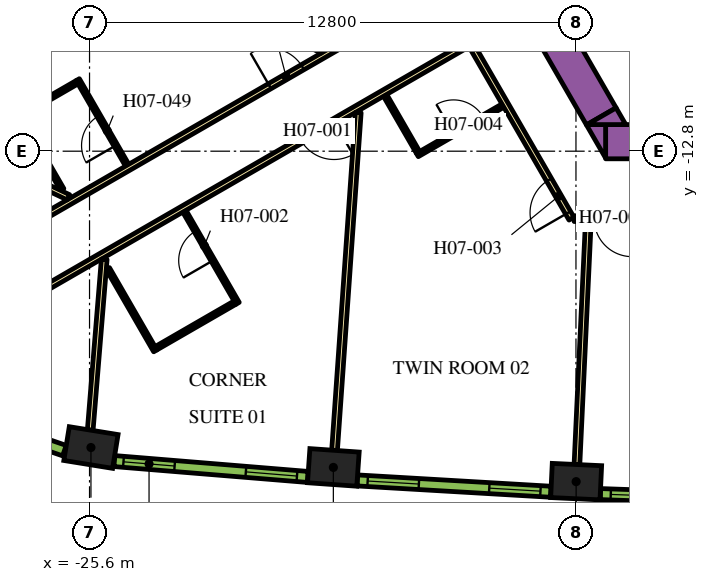
"""IFC4 building model, lengths in metres.
Left out: names, types, materials, properties, quantities, classifications, styles, units other than length and angle.
Written with IfcOpenShell. Run it as: python <this file> out.ifc"""

import sys

from ifc_helpers import new_model, si_unit, direction, frame, frame_2d, origin, origin_2d, place, context, subcontext, project, spatial, polyline, rectangle, outline, extrude, element, fill, save


model = new_model("IFC4")
c1 = context("Model", 3, precision=1e-05, world=origin(), true_north=direction((0.0, 1.0)))
c2 = subcontext(c1, "Body", "Model", "MODEL_VIEW")
j1 = project(units=[si_unit("LENGTHUNIT", "METRE"), si_unit("PLANEANGLEUNIT", "RADIAN")], contexts=[c1])
p1 = place(None, origin())
s1 = spatial("IfcSite", under=j1, at=p1, CompositionType="ELEMENT")
p2 = place(p1, origin())
s2 = spatial("IfcBuilding", under=s1, at=p2, CompositionType="ELEMENT")
p3 = place(p2, frame((0.0, 0.0, 103.2)))
s3 = spatial("IfcBuildingStorey", under=s2, at=p3, CompositionType="ELEMENT", Elevation=103.2)
for number, where, z_axis, x_axis in (
    (1, (-25.563, -20.597, 0.0), (0.0, 0.0, 1.0), (0.987, -0.159, 0.0)),
    (2, (-19.184, -21.12, 0.0), (0.0, 0.0, 1.0), (0.998, -0.07, 0.0)),
    (3, (-12.795, -21.494, 0.0), (0.0, 0.0, 1.0), (0.999, -0.047, 0.0)),
):
    element("IfcColumn", number, at=place(p3, frame(where, z_axis=z_axis, x_axis=x_axis)), inside=s3, PredefinedType="COLUMN", context=c2, shape_type="SweptSolid", body=[
        extrude(rectangle(XDim=1.3, YDim=0.9, at=origin_2d()), origin(), (0.0, 0.0, 1.0), 3.9),
    ])
p4 = place(p3, frame((-12.019, -12.55, 0.0), z_axis=(0.0, 0.0, 1.0), x_axis=(1.0, 0.0, 0.0)))
e4 = element("IfcWall", 4, at=p4, inside=s3, PredefinedType="SOLIDWALL", context=c2, shape_type="SweptSolid", body=[
    extrude(rectangle(XDim=21.63, YDim=0.9, at=frame_2d((10.815, 0.0))), origin(), (0.0, 0.0, 1.0), 3.9),
])
p5 = place(p3, origin())
e5 = element("IfcWall", 5, at=p5, inside=s3, PredefinedType="SOLIDWALL", context=c2, shape_type="SweptSolid", body=[
    extrude(outline(polyline([(-12.529, -12.1), (-12.021, -12.1), (-12.021, -12.98), (-12.529, -12.1)])), origin(), (0.0, 0.0, 1.0), 3.9),
])
p6 = place(p3, frame((-12.134, -11.883, 0.0), z_axis=(0.0, 0.0, 1.0), x_axis=(-0.500005339912, 0.866022320763, 0.0)))
e6 = element("IfcWall", 6, at=p6, inside=s3, PredefinedType="SOLIDWALL", context=c2, shape_type="SweptSolid", body=[
    extrude(rectangle(XDim=9.488, YDim=0.9, at=frame_2d((4.744, 0.0))), origin(), (0.0, 0.0, 1.0), 3.9),
])
e7 = element("IfcWall", 7, at=p5, inside=s3, PredefinedType="SOLIDWALL", context=c2, shape_type="SweptSolid", body=[
    extrude(outline(polyline([(-11.489, -12.1), (-12.505, -12.1), (-11.743, -11.66), (-11.489, -12.1)])), origin(), (0.0, 0.0, 1.0), 3.9),
])
p7 = place(p3, frame((-28.211, -15.335, 0.0), z_axis=(0.0, 0.0, 1.0), x_axis=(0.866025884867, 0.49999916674, 0.0)))
e8 = element("IfcWall", 8, at=p7, inside=s3, PredefinedType="PARTITIONING", context=c2, shape_type="SweptSolid", body=[
    extrude(rectangle(XDim=13.543, YDim=0.15, at=frame_2d((6.772, 0.0))), origin(), (0.0, 0.0, 1.0), 2.75),
])
p8 = place(p7, frame((8.488, 0.0, 0.0)))
e9 = element("IfcOpeningElement", 9, at=p8, cuts=e8, PredefinedType="OPENING", context=c2, shape_type="SweptSolid", body=[
    extrude(rectangle(XDim=1.0, YDim=2.1, at=frame_2d((0.5, 1.05))), frame((0.0, 0.085, 0.0), z_axis=(0.0, -1.0, 0.0), x_axis=(1.0, 0.0, 0.0)), (0.0, 0.0, 1.0), 0.17),
])
p9 = place(p3, frame((-15.587, -9.952, 0.0), z_axis=(0.0, 0.0, 1.0), x_axis=(-0.866017869832, -0.500013048961, 0.0)))
e10 = element("IfcWall", 10, at=p9, inside=s3, PredefinedType="PARTITIONING", context=c2, shape_type="SweptSolid", body=[
    extrude(rectangle(XDim=13.624, YDim=0.15, at=frame_2d((6.812, 0.0))), origin(), (0.0, 0.0, 1.0), 2.75),
])
p10 = place(p9, frame((4.134, 0.0, 0.0)))
e11 = element("IfcOpeningElement", 11, at=p10, cuts=e10, PredefinedType="OPENING", context=c2, shape_type="SweptSolid", body=[
    extrude(rectangle(XDim=1.0, YDim=2.1, at=frame_2d((0.5, 1.05))), frame((0.0, 0.085, 0.0), z_axis=(0.0, -1.0, 0.0), x_axis=(1.0, 0.0, 0.0)), (0.0, 0.0, 1.0), 0.17),
])
p11 = place(p3, frame((-12.918, -14.575, 0.0), z_axis=(0.0, 0.0, 1.0), x_axis=(-0.500009150678, 0.866020120573, 0.0)))
e12 = element("IfcWall", 12, at=p11, inside=s3, PredefinedType="PARTITIONING", context=c2, shape_type="SweptSolid", body=[
    extrude(rectangle(XDim=5.258, YDim=0.15, at=frame_2d((2.629, 0.0))), origin(), (0.0, 0.0, 1.0), 2.75),
])
p12 = place(p11, frame((0.18, 0.0, 0.0)))
e13 = element("IfcOpeningElement", 13, at=p12, cuts=e12, PredefinedType="OPENING", context=c2, shape_type="SweptSolid", body=[
    extrude(rectangle(XDim=1.0, YDim=2.1, at=frame_2d((0.5, 1.05))), frame((0.0, 0.085, 0.0), z_axis=(0.0, -1.0, 0.0), x_axis=(1.0, 0.0, 0.0)), (0.0, 0.0, 1.0), 0.17),
])
p13 = place(p3, frame((12.918, -14.575, 0.0), z_axis=(0.0, 0.0, 1.0), x_axis=(-1.0, 0.0, 0.0)))
e14 = element("IfcWall", 14, at=p13, inside=s3, PredefinedType="PARTITIONING", context=c2, shape_type="SweptSolid", body=[
    extrude(rectangle(XDim=25.766, YDim=0.15, at=frame_2d((12.883, 0.0))), origin(), (0.0, 0.0, 1.0), 2.75),
])
p14 = place(p13, frame((24.24, 0.0, 0.0)))
e15 = element("IfcOpeningElement", 15, at=p14, cuts=e14, PredefinedType="OPENING", context=c2, shape_type="SweptSolid", body=[
    extrude(rectangle(XDim=1.0, YDim=2.1, at=frame_2d((0.5, 1.05))), frame((0.0, 0.085, 0.0), z_axis=(0.0, -1.0, 0.0), x_axis=(1.0, 0.0, 0.0)), (0.0, 0.0, 1.0), 0.17),
])
p15 = place(p13, frame((13.144, 0.0, 0.0)))
e16 = element("IfcOpeningElement", 16, at=p15, cuts=e14, PredefinedType="OPENING", context=c2, shape_type="SweptSolid", body=[
    extrude(rectangle(XDim=1.0, YDim=2.1, at=frame_2d((0.5, 1.05))), frame((0.0, 0.085, 0.0), z_axis=(0.0, -1.0, 0.0), x_axis=(1.0, 0.0, 0.0)), (0.0, 0.0, 1.0), 0.17),
])
p16 = place(p13, frame((11.693, 0.0, 0.0)))
e17 = element("IfcOpeningElement", 17, at=p16, cuts=e14, PredefinedType="OPENING", context=c2, shape_type="SweptSolid", body=[
    extrude(rectangle(XDim=1.0, YDim=2.1, at=frame_2d((0.5, 1.05))), frame((0.0, 0.085, 0.0), z_axis=(0.0, -1.0, 0.0), x_axis=(1.0, 0.0, 0.0)), (0.0, 0.0, 1.0), 0.17),
])
p17 = place(p13, frame((0.596, 0.0, 0.0)))
e18 = element("IfcOpeningElement", 18, at=p17, cuts=e14, PredefinedType="OPENING", context=c2, shape_type="SweptSolid", body=[
    extrude(rectangle(XDim=1.0, YDim=2.1, at=frame_2d((0.5, 1.05))), frame((0.0, 0.085, 0.0), z_axis=(0.0, -1.0, 0.0), x_axis=(1.0, 0.0, 0.0)), (0.0, 0.0, 1.0), 0.17),
])
p18 = place(p3, frame((-30.231, -12.085, 0.0), z_axis=(0.0, 0.0, 1.0), x_axis=(0.904001132572, -0.427530060122, 0.0)))
e19 = element("IfcWall", 19, at=p18, inside=s3, PredefinedType="PARTITIONING", context=c2, shape_type="SweptSolid", body=[
    extrude(rectangle(XDim=4.51, YDim=0.15, at=frame_2d((2.255, 0.0))), origin(), (0.0, 0.0, 1.0), 2.75),
])
p19 = place(p3, frame((-25.582, -20.138, 0.0), z_axis=(0.0, 0.0, 1.0), x_axis=(0.081746132986, 0.996653184283, 0.0)))
e20 = element("IfcWall", 20, at=p19, inside=s3, PredefinedType="PARTITIONING", context=c2, shape_type="SweptSolid", body=[
    extrude(rectangle(XDim=4.51, YDim=0.15, at=frame_2d((2.255, 0.0))), origin(), (0.0, 0.0, 1.0), 2.75),
])
p20 = place(p3, frame((-27.479, -6.251, 0.0), z_axis=(0.0, 0.0, 1.0), x_axis=(0.898945877276, -0.438059710231, 0.0)))
e21 = element("IfcWall", 21, at=p20, inside=s3, PredefinedType="PARTITIONING", context=c2, shape_type="SweptSolid", body=[
    extrude(rectangle(XDim=8.909, YDim=0.15, at=frame_2d((4.455, 0.0))), origin(), (0.0, 0.0, 1.0), 2.75),
])
p21 = place(p3, frame((-19.153, -20.671, 0.0), z_axis=(0.0, 0.0, 1.0), x_axis=(0.070070736723, 0.997542025107, 0.0)))
e22 = element("IfcWall", 22, at=p21, inside=s3, PredefinedType="PARTITIONING", context=c2, shape_type="SweptSolid", body=[
    extrude(rectangle(XDim=8.909, YDim=0.15, at=frame_2d((4.455, 0.0))), origin(), (0.0, 0.0, 1.0), 2.75),
])
p22 = place(p3, frame((-12.774, -21.045, 0.0), z_axis=(0.0, 0.0, 1.0), x_axis=(0.046750341626, 0.998906605023, 0.0)))
e23 = element("IfcWall", 23, at=p22, inside=s3, PredefinedType="PARTITIONING", context=c2, shape_type="SweptSolid", body=[
    extrude(rectangle(XDim=6.392, YDim=0.15, at=frame_2d((3.196, 0.0))), origin(), (0.0, 0.0, 1.0), 2.75),
])
p23 = place(p3, frame((-21.704, -16.803, 0.0), z_axis=(0.0, 0.0, 1.0), x_axis=(-0.500049511043, 0.865996816683, 0.0)))
e24 = element("IfcWall", 24, at=p23, inside=s3, PredefinedType="PARTITIONING", context=c2, shape_type="SweptSolid", body=[
    extrude(rectangle(XDim=2.8, YDim=0.1, at=frame_2d((1.4, 0.0))), origin(), (0.0, 0.0, 1.0), 2.75),
])
p24 = place(p23, frame((1.3, 0.0, 0.0)))
e25 = element("IfcOpeningElement", 25, at=p24, cuts=e24, PredefinedType="OPENING", context=c2, shape_type="SweptSolid", body=[
    extrude(rectangle(XDim=0.9, YDim=2.1, at=frame_2d((0.45, 1.05))), frame((0.0, 0.06, 0.0), z_axis=(0.0, -1.0, 0.0), x_axis=(1.0, 0.0, 0.0)), (0.0, 0.0, 1.0), 0.12),
])
p25 = place(p3, frame((-21.772, -16.785, 0.0), z_axis=(0.0, 0.0, 1.0), x_axis=(-0.866024647952, -0.500001309137, 0.0)))
e26 = element("IfcWall", 26, at=p25, inside=s3, PredefinedType="PARTITIONING", context=c2, shape_type="SweptSolid", body=[
    extrude(rectangle(XDim=2.4, YDim=0.1, at=frame_2d((1.2, 0.0))), origin(), (0.0, 0.0, 1.0), 2.75),
])
p26 = place(p3, frame((-25.119, -15.888, 0.0), z_axis=(0.0, 0.0, 1.0), x_axis=(0.500046524342, -0.865998541277, 0.0)))
e27 = element("IfcWall", 27, at=p26, inside=s3, PredefinedType="PARTITIONING", context=c2, shape_type="SweptSolid", body=[
    extrude(rectangle(XDim=2.5, YDim=0.1, at=frame_2d((1.25, 0.0))), origin(), (0.0, 0.0, 1.0), 2.75),
])
p27 = place(p3, frame((-16.974, -12.9, 0.0), z_axis=(0.0, 0.0, 1.0), x_axis=(0.865997922154, 0.500047596559, 0.0)))
e28 = element("IfcWall", 28, at=p27, inside=s3, PredefinedType="PARTITIONING", context=c2, shape_type="SweptSolid", body=[
    extrude(rectangle(XDim=2.6, YDim=0.1, at=frame_2d((1.3, 0.0))), origin(), (0.0, 0.0, 1.0), 2.75),
])
p28 = place(p27, frame((1.1, 0.0, 0.0)))
e29 = element("IfcOpeningElement", 29, at=p28, cuts=e28, PredefinedType="OPENING", context=c2, shape_type="SweptSolid", body=[
    extrude(rectangle(XDim=0.9, YDim=2.1, at=frame_2d((0.45, 1.05))), frame((0.0, 0.06, 0.0), z_axis=(0.0, -1.0, 0.0), x_axis=(1.0, 0.0, 0.0)), (0.0, 0.0, 1.0), 0.12),
])
p29 = place(p3, frame((-16.956, -12.832, 0.0), z_axis=(0.0, 0.0, 1.0), x_axis=(-0.499978980201, 0.866037539231, 0.0)))
e30 = element("IfcWall", 30, at=p29, inside=s3, PredefinedType="PARTITIONING", context=c2, shape_type="SweptSolid", body=[
    extrude(rectangle(XDim=1.73, YDim=0.1, at=frame_2d((0.865, 0.0))), origin(), (0.0, 0.0, 1.0), 2.75),
])
p30 = place(p3, frame((-24.61, -13.169, 0.0), z_axis=(0.0, 0.0, 1.0), x_axis=(-0.500006934395, 0.866021400173, 0.0)))
e31 = element("IfcWall", 31, at=p30, inside=s3, PredefinedType="PARTITIONING", context=c2, shape_type="SweptSolid", body=[
    extrude(rectangle(XDim=2.6, YDim=0.1, at=frame_2d((1.3, 0.0))), origin(), (0.0, 0.0, 1.0), 2.75),
])
p31 = place(p30, frame((0.6, 0.0, 0.0)))
e32 = element("IfcOpeningElement", 32, at=p31, cuts=e31, PredefinedType="OPENING", context=c2, shape_type="SweptSolid", body=[
    extrude(rectangle(XDim=0.9, YDim=2.1, at=frame_2d((0.45, 1.05))), frame((0.0, 0.06, 0.0), z_axis=(0.0, -1.0, 0.0), x_axis=(1.0, 0.0, 0.0)), (0.0, 0.0, 1.0), 0.12),
])
p32 = place(p3, frame((-25.928, -10.986, 0.0), z_axis=(0.0, 0.0, 1.0), x_axis=(-0.865989465428, -0.500062241894, 0.0)))
e33 = element("IfcWall", 33, at=p32, inside=s3, PredefinedType="PARTITIONING", context=c2, shape_type="SweptSolid", body=[
    extrude(rectangle(XDim=1.7, YDim=0.1, at=frame_2d((0.85, 0.0))), origin(), (0.0, 0.0, 1.0), 2.75),
])
p33 = place(p3, frame((-26.319, -13.81, 0.0), z_axis=(0.0, 0.0, 1.0), x_axis=(-0.499952165731, 0.866053019151, 0.0)))
e34 = element("IfcWall", 34, at=p33, inside=s3, PredefinedType="PARTITIONING", context=c2, shape_type="SweptSolid", body=[
    extrude(rectangle(XDim=2.3, YDim=0.1, at=frame_2d((1.15, 0.0))), origin(), (0.0, 0.0, 1.0), 2.75),
])
p34 = place(p3, frame((-24.946, -20.954, 0.0), z_axis=(0.0, 0.0, 1.0), x_axis=(0.99665273362, -0.081751627308, 0.0)))
e35 = element("IfcWall", 35, at=p34, inside=s3, PredefinedType="SOLIDWALL", context=c2, shape_type="SweptSolid", body=[
    extrude(rectangle(XDim=5.107, YDim=0.29, at=frame_2d((2.553, 0.0))), origin(), (0.0, 0.0, 1.0), 3.65),
])
p35 = place(p34, frame((0.24, 0.0, 0.9)))
e36 = element("IfcOpeningElement", 36, at=p35, cuts=e35, PredefinedType="OPENING", context=c2, shape_type="SweptSolid", body=[
    extrude(rectangle(XDim=1.35, YDim=2.15, at=frame_2d((0.675, 1.075))), frame((0.0, 0.155, 0.0), z_axis=(0.0, -1.0, 0.0), x_axis=(1.0, 0.0, 0.0)), (0.0, 0.0, 1.0), 0.31),
])
p36 = place(p34, frame((3.471, 0.0, 0.9)))
e37 = element("IfcOpeningElement", 37, at=p36, cuts=e35, PredefinedType="OPENING", context=c2, shape_type="SweptSolid", body=[
    extrude(rectangle(XDim=1.35, YDim=2.15, at=frame_2d((0.675, 1.075))), frame((0.0, 0.155, 0.0), z_axis=(0.0, -1.0, 0.0), x_axis=(1.0, 0.0, 0.0)), (0.0, 0.0, 1.0), 0.31),
])
p37 = place(p3, frame((-18.553, -21.463, 0.0), z_axis=(0.0, 0.0, 1.0), x_axis=(0.998290511436, -0.058447025388, 0.0)))
e38 = element("IfcWall", 38, at=p37, inside=s3, PredefinedType="SOLIDWALL", context=c2, shape_type="SweptSolid", body=[
    extrude(rectangle(XDim=5.1, YDim=0.29, at=frame_2d((2.55, 0.0))), origin(), (0.0, 0.0, 1.0), 3.65),
])
p38 = place(p37, frame((0.273, 0.0, 0.9)))
e39 = element("IfcOpeningElement", 39, at=p38, cuts=e38, PredefinedType="OPENING", context=c2, shape_type="SweptSolid", body=[
    extrude(rectangle(XDim=1.35, YDim=2.15, at=frame_2d((0.675, 1.075))), frame((0.0, 0.155, 0.0), z_axis=(0.0, -1.0, 0.0), x_axis=(1.0, 0.0, 0.0)), (0.0, 0.0, 1.0), 0.31),
])
p39 = place(p37, frame((3.478, 0.0, 0.9)))
e40 = element("IfcOpeningElement", 40, at=p39, cuts=e38, PredefinedType="OPENING", context=c2, shape_type="SweptSolid", body=[
    extrude(rectangle(XDim=1.35, YDim=2.15, at=frame_2d((0.675, 1.075))), frame((0.0, 0.155, 0.0), z_axis=(0.0, -1.0, 0.0), x_axis=(1.0, 0.0, 0.0)), (0.0, 0.0, 1.0), 0.31),
])
p40 = place(p3, frame((-12.157, -21.822, 0.0), z_axis=(0.0, 0.0, 1.0), x_axis=(0.999385993957, -0.035037623812, 0.0)))
e41 = element("IfcWall", 41, at=p40, inside=s3, PredefinedType="SOLIDWALL", context=c2, shape_type="SweptSolid", body=[
    extrude(rectangle(XDim=5.101, YDim=0.29, at=frame_2d((2.55, 0.0))), origin(), (0.0, 0.0, 1.0), 3.65),
])
p41 = place(p40, frame((0.273, 0.0, 0.9)))
e42 = element("IfcOpeningElement", 42, at=p41, cuts=e41, PredefinedType="OPENING", context=c2, shape_type="SweptSolid", body=[
    extrude(rectangle(XDim=1.35, YDim=2.15, at=frame_2d((0.675, 1.075))), frame((0.0, 0.155, 0.0), z_axis=(0.0, -1.0, 0.0), x_axis=(1.0, 0.0, 0.0)), (0.0, 0.0, 1.0), 0.31),
])
p42 = place(p40, frame((3.478, 0.0, 0.9)))
e43 = element("IfcOpeningElement", 43, at=p42, cuts=e41, PredefinedType="OPENING", context=c2, shape_type="SweptSolid", body=[
    extrude(rectangle(XDim=1.35, YDim=2.15, at=frame_2d((0.675, 1.075))), frame((0.0, 0.155, 0.0), z_axis=(0.0, -1.0, 0.0), x_axis=(1.0, 0.0, 0.0)), (0.0, 0.0, 1.0), 0.31),
])
p43 = place(p3, frame((-27.981, -20.086, 0.0), z_axis=(0.0, 0.0, 1.0), x_axis=(0.945385815453, -0.325953462844, 0.0)))
e44 = element("IfcWall", 44, at=p43, inside=s3, PredefinedType="SOLIDWALL", context=c2, shape_type="SweptSolid", body=[
    extrude(rectangle(XDim=1.819, YDim=0.29, at=frame_2d((0.91, 0.0))), origin(), (0.0, 0.0, 1.0), 3.65),
])
p44 = place(p43, frame((0.46, 0.0, 0.9)))
e45 = element("IfcOpeningElement", 45, at=p44, cuts=e44, PredefinedType="OPENING", context=c2, shape_type="SweptSolid", body=[
    extrude(rectangle(XDim=0.9, YDim=2.15, at=frame_2d((0.45, 1.075))), frame((0.0, 0.155, 0.0), z_axis=(0.0, -1.0, 0.0), x_axis=(1.0, 0.0, 0.0)), (0.0, 0.0, 1.0), 0.31),
])
p45 = place(p10, origin())
e46 = element("IfcDoor", 46, at=p45, inside=s3, OperationType="SINGLE_SWING_LEFT", PredefinedType="DOOR", context=c2, shape_type="SweptSolid", body=[
    extrude(rectangle(XDim=1.0, YDim=2.1, at=frame_2d((0.5, 1.05))), frame((0.0, 0.025, 0.0), z_axis=(0.0, -1.0, 0.0), x_axis=(1.0, 0.0, 0.0)), (0.0, 0.0, 1.0), 0.05),
])
fill(e11, e46)
p46 = place(p24, origin())
e47 = element("IfcDoor", 47, at=p46, inside=s3, OperationType="SINGLE_SWING_LEFT", PredefinedType="DOOR", context=c2, shape_type="SweptSolid", body=[
    extrude(rectangle(XDim=0.9, YDim=2.1, at=frame_2d((0.45, 1.05))), frame((0.0, 0.025, 0.0), z_axis=(0.0, -1.0, 0.0), x_axis=(1.0, 0.0, 0.0)), (0.0, 0.0, 1.0), 0.05),
])
fill(e25, e47)
p47 = place(p12, origin())
e48 = element("IfcDoor", 48, at=p47, inside=s3, OperationType="SINGLE_SWING_LEFT", PredefinedType="DOOR", context=c2, shape_type="SweptSolid", body=[
    extrude(rectangle(XDim=1.0, YDim=2.1, at=frame_2d((0.5, 1.05))), frame((0.0, 0.025, 0.0), z_axis=(0.0, -1.0, 0.0), x_axis=(1.0, 0.0, 0.0)), (0.0, 0.0, 1.0), 0.05),
])
fill(e13, e48)
p48 = place(p28, origin())
e49 = element("IfcDoor", 49, at=p48, inside=s3, OperationType="SINGLE_SWING_LEFT", PredefinedType="DOOR", context=c2, shape_type="SweptSolid", body=[
    extrude(rectangle(XDim=0.9, YDim=2.1, at=frame_2d((0.45, 1.05))), frame((0.0, 0.025, 0.0), z_axis=(0.0, -1.0, 0.0), x_axis=(1.0, 0.0, 0.0)), (0.0, 0.0, 1.0), 0.05),
])
fill(e29, e49)
p49 = place(p14, origin())
e50 = element("IfcDoor", 50, at=p49, inside=s3, OperationType="SINGLE_SWING_RIGHT", PredefinedType="DOOR", context=c2, shape_type="SweptSolid", body=[
    extrude(rectangle(XDim=1.0, YDim=2.1, at=frame_2d((0.5, 1.05))), frame((0.0, 0.025, 0.0), z_axis=(0.0, -1.0, 0.0), x_axis=(1.0, 0.0, 0.0)), (0.0, 0.0, 1.0), 0.05),
])
fill(e15, e50)
p50 = place(p8, origin())
e51 = element("IfcDoor", 51, at=p50, inside=s3, OperationType="SINGLE_SWING_RIGHT", PredefinedType="DOOR", context=c2, shape_type="SweptSolid", body=[
    extrude(rectangle(XDim=1.0, YDim=2.1, at=frame_2d((0.5, 1.05))), frame((0.0, 0.025, 0.0), z_axis=(0.0, -1.0, 0.0), x_axis=(1.0, 0.0, 0.0)), (0.0, 0.0, 1.0), 0.05),
])
fill(e9, e51)
p51 = place(p31, origin())
e52 = element("IfcDoor", 52, at=p51, inside=s3, OperationType="SINGLE_SWING_LEFT", PredefinedType="DOOR", context=c2, shape_type="SweptSolid", body=[
    extrude(rectangle(XDim=0.9, YDim=2.1, at=frame_2d((0.45, 1.05))), frame((0.0, 0.025, 0.0), z_axis=(0.0, -1.0, 0.0), x_axis=(1.0, 0.0, 0.0)), (0.0, 0.0, 1.0), 0.05),
])
fill(e32, e52)
p52 = place(p35, origin())
e53 = element("IfcWindow", 53, at=p52, inside=s3, PartitioningType="DOUBLE_PANEL_VERTICAL", PredefinedType="WINDOW", context=c2, shape_type="SweptSolid", body=[
    extrude(rectangle(XDim=1.35, YDim=2.15, at=frame_2d((0.675, 1.075))), frame((0.0, 0.015, 0.0), z_axis=(0.0, -1.0, 0.0), x_axis=(1.0, 0.0, 0.0)), (0.0, 0.0, 1.0), 0.06),
])
fill(e36, e53)
p53 = place(p36, origin())
e54 = element("IfcWindow", 54, at=p53, inside=s3, PartitioningType="DOUBLE_PANEL_VERTICAL", PredefinedType="WINDOW", context=c2, shape_type="SweptSolid", body=[
    extrude(rectangle(XDim=1.35, YDim=2.15, at=frame_2d((0.675, 1.075))), frame((0.0, 0.015, 0.0), z_axis=(0.0, -1.0, 0.0), x_axis=(1.0, 0.0, 0.0)), (0.0, 0.0, 1.0), 0.06),
])
fill(e37, e54)
p54 = place(p38, origin())
e55 = element("IfcWindow", 55, at=p54, inside=s3, PartitioningType="DOUBLE_PANEL_VERTICAL", PredefinedType="WINDOW", context=c2, shape_type="SweptSolid", body=[
    extrude(rectangle(XDim=1.35, YDim=2.15, at=frame_2d((0.675, 1.075))), frame((0.0, 0.015, 0.0), z_axis=(0.0, -1.0, 0.0), x_axis=(1.0, 0.0, 0.0)), (0.0, 0.0, 1.0), 0.06),
])
fill(e39, e55)
p55 = place(p39, origin())
e56 = element("IfcWindow", 56, at=p55, inside=s3, PartitioningType="DOUBLE_PANEL_VERTICAL", PredefinedType="WINDOW", context=c2, shape_type="SweptSolid", body=[
    extrude(rectangle(XDim=1.35, YDim=2.15, at=frame_2d((0.675, 1.075))), frame((0.0, 0.015, 0.0), z_axis=(0.0, -1.0, 0.0), x_axis=(1.0, 0.0, 0.0)), (0.0, 0.0, 1.0), 0.06),
])
fill(e40, e56)
p56 = place(p41, origin())
e57 = element("IfcWindow", 57, at=p56, inside=s3, PartitioningType="DOUBLE_PANEL_VERTICAL", PredefinedType="WINDOW", context=c2, shape_type="SweptSolid", body=[
    extrude(rectangle(XDim=1.35, YDim=2.15, at=frame_2d((0.675, 1.075))), frame((0.0, 0.015, 0.0), z_axis=(0.0, -1.0, 0.0), x_axis=(1.0, 0.0, 0.0)), (0.0, 0.0, 1.0), 0.06),
])
fill(e42, e57)
save(model, sys.argv[1])
